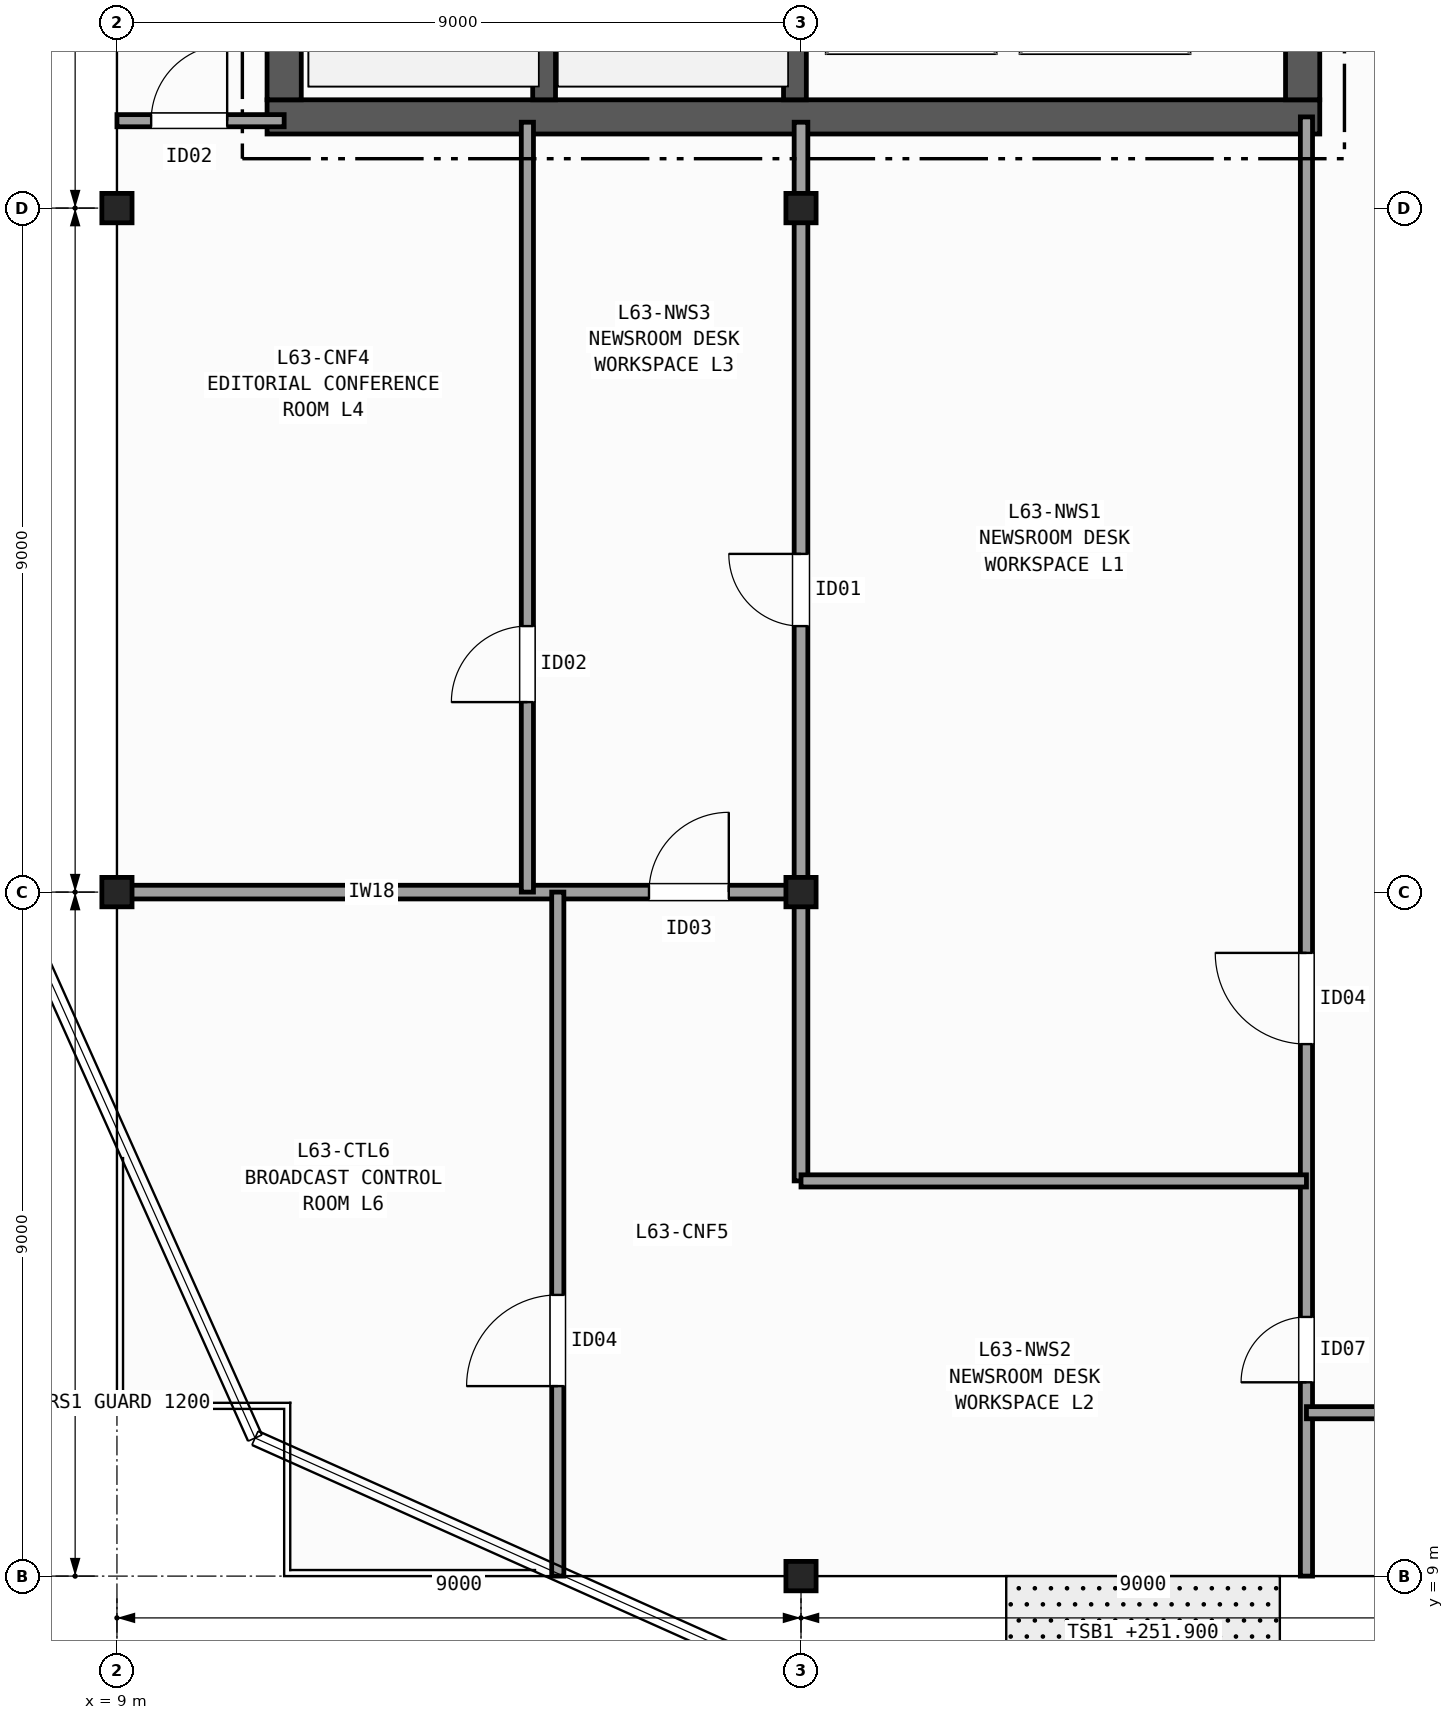
"""IFC4 building model, lengths in metres.
Left out: names, types, materials, properties, quantities, classifications, styles, units other than length and angle.
Written with IfcOpenShell. Run it as: python <this file> out.ifc"""

import sys

from ifc_helpers import new_model, si_unit, direction, frame, frame_2d, origin, origin_2d, place, context, subcontext, project, spatial, rectangle, i_section, extrude, element, fill, save


model = new_model("IFC4")
c1 = context("Model", 3, precision=1e-05, world=origin(), true_north=direction((0.0, 1.0)))
c2 = subcontext(c1, "Body", "Model", "MODEL_VIEW")
j1 = project(units=[si_unit("LENGTHUNIT", "METRE"), si_unit("PLANEANGLEUNIT", "RADIAN")], contexts=[c1])
p1 = place(None, origin())
s1 = spatial("IfcSite", under=j1, at=p1, CompositionType="ELEMENT")
p2 = place(p1, origin())
s2 = spatial("IfcBuilding", under=s1, at=p2, CompositionType="ELEMENT")
p3 = place(p2, frame((0.0, 0.0, 251.9)))
s3 = spatial("IfcBuildingStorey", under=s2, at=p3, CompositionType="ELEMENT", Elevation=251.9)
for number, where, z_axis, x_axis in (
    (1, (9.0, 18.0, 0.0), (0.0, 0.0, 1.0), (1.0, 0.0, 0.0)),
    (2, (9.0, 27.0, 0.0), (0.0, 0.0, 1.0), (1.0, 0.0, 0.0)),
    (3, (18.0, 9.0, 0.0), (0.0, 0.0, 1.0), (1.0, 0.0, 0.0)),
    (4, (18.0, 18.0, 0.0), (0.0, 0.0, 1.0), (1.0, 0.0, 0.0)),
    (5, (18.0, 27.0, 0.0), (0.0, 0.0, 1.0), (1.0, 0.0, 0.0)),
):
    element("IfcColumn", number, at=place(p3, frame(where, z_axis=z_axis, x_axis=x_axis)), inside=s3, PredefinedType="COLUMN", context=c2, shape_type="SweptSolid", body=[
        extrude(i_section(OverallWidth=0.397, OverallDepth=0.387, WebThickness=0.021, FlangeThickness=0.033, FilletRadius=0.015, at=origin_2d()), origin(), (0.0, 0.0, 1.0), 3.7),
    ])
p4 = place(p3, frame((10.975, 28.2, 0.0), z_axis=(0.0, 0.0, 1.0), x_axis=(1.0, 0.0, 0.0)))
e6 = element("IfcWall", 6, at=p4, inside=s3, PredefinedType="SHEAR", context=c2, shape_type="SweptSolid", body=[
    extrude(rectangle(XDim=13.85, YDim=0.45, at=frame_2d((6.925, 0.0))), origin(), (0.0, 0.0, 1.0), 3.42),
])
p5 = place(p3, frame((11.2, 42.175, 0.0), z_axis=(0.0, 0.0, 1.0), x_axis=(0.0, -1.0, 0.0)))
e7 = element("IfcWall", 7, at=p5, inside=s3, PredefinedType="SHEAR", context=c2, shape_type="SweptSolid", body=[
    extrude(rectangle(XDim=13.75, YDim=0.45, at=frame_2d((6.875, 0.0))), origin(), (0.0, 0.0, 1.0), 3.42),
])
p6 = place(p3, frame((24.6, 28.425, 0.0), z_axis=(0.0, 0.0, 1.0), x_axis=(0.0, 1.0, 0.0)))
e8 = element("IfcWall", 8, at=p6, inside=s3, PredefinedType="SHEAR", context=c2, shape_type="SweptSolid", body=[
    extrude(rectangle(XDim=13.75, YDim=0.45, at=frame_2d((6.875, 0.0))), origin(), (0.0, 0.0, 1.0), 3.42),
])
p7 = place(p6, frame((3.375, 0.0, 0.0)))
e9 = element("IfcOpeningElement", 9, at=p7, cuts=e8, PredefinedType="OPENING", context=c2, shape_type="SweptSolid", body=[
    extrude(rectangle(XDim=1.5, YDim=2.2, at=frame_2d((0.75, 1.1))), frame((0.0, 0.235, 0.0), z_axis=(0.0, -1.0, 0.0), x_axis=(1.0, 0.0, 0.0)), (0.0, 0.0, 1.0), 0.47),
])
p8 = place(p6, frame((9.975, 0.0, 0.0)))
e10 = element("IfcOpeningElement", 10, at=p8, cuts=e8, PredefinedType="OPENING", context=c2, shape_type="SweptSolid", body=[
    extrude(rectangle(XDim=0.9, YDim=2.1, at=frame_2d((0.45, 1.05))), frame((0.0, 0.235, 0.0), z_axis=(0.0, -1.0, 0.0), x_axis=(1.0, 0.0, 0.0)), (0.0, 0.0, 1.0), 0.47),
])
p9 = place(p6, frame((12.075, 0.0, 0.0)))
e11 = element("IfcOpeningElement", 11, at=p9, cuts=e8, PredefinedType="OPENING", context=c2, shape_type="SweptSolid", body=[
    extrude(rectangle(XDim=0.9, YDim=2.1, at=frame_2d((0.45, 1.05))), frame((0.0, 0.235, 0.0), z_axis=(0.0, -1.0, 0.0), x_axis=(1.0, 0.0, 0.0)), (0.0, 0.0, 1.0), 0.47),
])
p10 = place(p3, frame((14.62, 28.425, 0.0), z_axis=(0.0, 0.0, 1.0), x_axis=(0.0, 1.0, 0.0)))
e12 = element("IfcWall", 12, at=p10, inside=s3, PredefinedType="SHEAR", context=c2, shape_type="SweptSolid", body=[
    extrude(rectangle(XDim=9.025, YDim=0.3, at=frame_2d((4.512, 0.0))), origin(), (0.0, 0.0, 1.0), 3.42),
])
p11 = place(p3, frame((17.92, 42.175, 0.0), z_axis=(0.0, 0.0, 1.0), x_axis=(0.0, -1.0, 0.0)))
e13 = element("IfcWall", 13, at=p11, inside=s3, PredefinedType="SHEAR", context=c2, shape_type="SweptSolid", body=[
    extrude(rectangle(XDim=13.75, YDim=0.3, at=frame_2d((6.875, 0.0))), origin(), (0.0, 0.0, 1.0), 3.42),
])
p12 = place(p11, frame((2.0, 0.0, 0.0)))
e14 = element("IfcOpeningElement", 14, at=p12, cuts=e13, PredefinedType="OPENING", context=c2, shape_type="SweptSolid", body=[
    extrude(rectangle(XDim=1.15, YDim=2.15, at=frame_2d((0.575, 1.075))), frame((0.0, 0.16, 0.0), z_axis=(0.0, -1.0, 0.0), x_axis=(1.0, 0.0, 0.0)), (0.0, 0.0, 1.0), 0.32),
])
p13 = place(p3, frame((9.0, 28.15, 0.0), z_axis=(0.0, 0.0, 1.0), x_axis=(1.0, 0.0, 0.0)))
e15 = element("IfcWall", 15, at=p13, inside=s3, PredefinedType="PARTITIONING", context=c2, shape_type="SweptSolid", body=[
    extrude(rectangle(XDim=2.2, YDim=0.16, at=frame_2d((1.1, 0.0))), origin(), (0.0, 0.0, 1.0), 2.707),
])
p14 = place(p13, frame((0.45, 0.0, 0.0)))
e16 = element("IfcOpeningElement", 16, at=p14, cuts=e15, PredefinedType="OPENING", context=c2, shape_type="SweptSolid", body=[
    extrude(rectangle(XDim=1.0, YDim=2.1, at=frame_2d((0.5, 1.05))), frame((0.0, 0.09, 0.0), z_axis=(0.0, -1.0, 0.0), x_axis=(1.0, 0.0, 0.0)), (0.0, 0.0, 1.0), 0.18),
])
p15 = place(p3, frame((24.65, 9.0, 0.0), z_axis=(0.0, 0.0, 1.0), x_axis=(0.0, 1.0, 0.0)))
e17 = element("IfcWall", 17, at=p15, inside=s3, PredefinedType="PARTITIONING", context=c2, shape_type="SweptSolid", body=[
    extrude(rectangle(XDim=19.2, YDim=0.16, at=frame_2d((9.6, 0.0))), origin(), (0.0, 0.0, 1.0), 2.707),
])
p16 = place(p15, frame((7.0, 0.0, 0.0)))
e18 = element("IfcOpeningElement", 18, at=p16, cuts=e17, PredefinedType="OPENING", context=c2, shape_type="SweptSolid", body=[
    extrude(rectangle(XDim=1.2, YDim=2.15, at=frame_2d((0.6, 1.075))), frame((0.0, 0.09, 0.0), z_axis=(0.0, -1.0, 0.0), x_axis=(1.0, 0.0, 0.0)), (0.0, 0.0, 1.0), 0.18),
])
p17 = place(p15, frame((2.55, 0.0, 0.0)))
e19 = element("IfcOpeningElement", 19, at=p17, cuts=e17, PredefinedType="OPENING", context=c2, shape_type="SweptSolid", body=[
    extrude(rectangle(XDim=0.86, YDim=2.05, at=frame_2d((0.43, 1.025))), frame((0.0, 0.09, 0.0), z_axis=(0.0, -1.0, 0.0), x_axis=(1.0, 0.0, 0.0)), (0.0, 0.0, 1.0), 0.18),
])
p18 = place(p3, frame((9.0, 18.0, 0.0), z_axis=(0.0, 0.0, 1.0), x_axis=(1.0, 0.0, 0.0)))
e20 = element("IfcWall", 20, at=p18, inside=s3, PredefinedType="PARTITIONING", context=c2, shape_type="SweptSolid", body=[
    extrude(rectangle(XDim=9.08, YDim=0.18, at=frame_2d((4.54, 0.0))), origin(), (0.0, 0.0, 1.0), 2.707),
])
p19 = place(p18, frame((7.0, 0.0, 0.0)))
e21 = element("IfcOpeningElement", 21, at=p19, cuts=e20, PredefinedType="OPENING", context=c2, shape_type="SweptSolid", body=[
    extrude(rectangle(XDim=1.05, YDim=2.15, at=frame_2d((0.525, 1.075))), frame((0.0, 0.1, 0.0), z_axis=(0.0, -1.0, 0.0), x_axis=(1.0, 0.0, 0.0)), (0.0, 0.0, 1.0), 0.2),
])
p20 = place(p3, frame((18.0, 14.2, 0.0), z_axis=(0.0, 0.0, 1.0), x_axis=(0.0, 1.0, 0.0)))
e22 = element("IfcWall", 22, at=p20, inside=s3, PredefinedType="PARTITIONING", context=c2, shape_type="SweptSolid", body=[
    extrude(rectangle(XDim=13.93, YDim=0.18, at=frame_2d((6.965, 0.0))), origin(), (0.0, 0.0, 1.0), 2.789),
])
p21 = place(p20, frame((7.3, 0.0, 0.0)))
e23 = element("IfcOpeningElement", 23, at=p21, cuts=e22, PredefinedType="OPENING", context=c2, shape_type="SweptSolid", body=[
    extrude(rectangle(XDim=0.95, YDim=2.1, at=frame_2d((0.475, 1.05))), frame((0.0, 0.1, 0.0), z_axis=(0.0, -1.0, 0.0), x_axis=(1.0, 0.0, 0.0)), (0.0, 0.0, 1.0), 0.2),
])
p22 = place(p3, frame((18.0, 14.2, 0.0), z_axis=(0.0, 0.0, 1.0), x_axis=(1.0, 0.0, 0.0)))
e24 = element("IfcWall", 24, at=p22, inside=s3, PredefinedType="PARTITIONING", context=c2, shape_type="SweptSolid", body=[
    extrude(rectangle(XDim=6.65, YDim=0.16, at=frame_2d((3.325, 0.0))), origin(), (0.0, 0.0, 1.0), 2.789),
])
p23 = place(p3, frame((14.4, 18.0, 0.0), z_axis=(0.0, 0.0, 1.0), x_axis=(0.0, 1.0, 0.0)))
e25 = element("IfcWall", 25, at=p23, inside=s3, PredefinedType="PARTITIONING", context=c2, shape_type="SweptSolid", body=[
    extrude(rectangle(XDim=10.13, YDim=0.16, at=frame_2d((5.065, 0.0))), origin(), (0.0, 0.0, 1.0), 2.789),
])
p24 = place(p23, frame((2.5, 0.0, 0.0)))
e26 = element("IfcOpeningElement", 26, at=p24, cuts=e25, PredefinedType="OPENING", context=c2, shape_type="SweptSolid", body=[
    extrude(rectangle(XDim=1.0, YDim=2.1, at=frame_2d((0.5, 1.05))), frame((0.0, 0.09, 0.0), z_axis=(0.0, -1.0, 0.0), x_axis=(1.0, 0.0, 0.0)), (0.0, 0.0, 1.0), 0.18),
])
p25 = place(p3, frame((14.8, 9.0, 0.0), z_axis=(0.0, 0.0, 1.0), x_axis=(0.0, 1.0, 0.0)))
e27 = element("IfcWall", 27, at=p25, inside=s3, PredefinedType="PARTITIONING", context=c2, shape_type="SweptSolid", body=[
    extrude(rectangle(XDim=9.0, YDim=0.16, at=frame_2d((4.5, 0.0))), origin(), (0.0, 0.0, 1.0), 2.789),
])
p26 = place(p25, frame((2.5, 0.0, 0.0)))
e28 = element("IfcOpeningElement", 28, at=p26, cuts=e27, PredefinedType="OPENING", context=c2, shape_type="SweptSolid", body=[
    extrude(rectangle(XDim=1.2, YDim=2.15, at=frame_2d((0.6, 1.075))), frame((0.0, 0.09, 0.0), z_axis=(0.0, -1.0, 0.0), x_axis=(1.0, 0.0, 0.0)), (0.0, 0.0, 1.0), 0.18),
])
p27 = place(p3, frame((24.65, 11.15, 0.0), z_axis=(0.0, 0.0, 1.0), x_axis=(1.0, 0.0, 0.0)))
e29 = element("IfcWall", 29, at=p27, inside=s3, PredefinedType="PARTITIONING", context=c2, shape_type="SweptSolid", body=[
    extrude(rectangle(XDim=4.75, YDim=0.16, at=frame_2d((2.375, 0.0))), origin(), (0.0, 0.0, 1.0), 2.792),
])
p28 = place(p27, frame((1.2, 0.0, 0.0)))
e30 = element("IfcOpeningElement", 30, at=p28, cuts=e29, PredefinedType="OPENING", context=c2, shape_type="SweptSolid", body=[
    extrude(rectangle(XDim=0.86, YDim=2.05, at=frame_2d((0.43, 1.025))), frame((0.0, 0.09, 0.0), z_axis=(0.0, -1.0, 0.0), x_axis=(1.0, 0.0, 0.0)), (0.0, 0.0, 1.0), 0.18),
])
p29 = place(p14, origin())
e31 = element("IfcDoor", 31, at=p29, inside=s3, OperationType="SINGLE_SWING_RIGHT", PredefinedType="DOOR", context=c2, shape_type="SweptSolid", body=[
    extrude(rectangle(XDim=1.0, YDim=2.1, at=frame_2d((0.5, 1.05))), frame((0.0, 0.025, 0.0), z_axis=(0.0, -1.0, 0.0), x_axis=(1.0, 0.0, 0.0)), (0.0, 0.0, 1.0), 0.05),
])
fill(e16, e31)
p30 = place(p16, origin())
e32 = element("IfcDoor", 32, at=p30, inside=s3, OperationType="SINGLE_SWING_RIGHT", PredefinedType="DOOR", context=c2, shape_type="SweptSolid", body=[
    extrude(rectangle(XDim=1.2, YDim=2.15, at=frame_2d((0.6, 1.075))), frame((0.0, 0.025, 0.0), z_axis=(0.0, -1.0, 0.0), x_axis=(1.0, 0.0, 0.0)), (0.0, 0.0, 1.0), 0.05),
])
fill(e18, e32)
p31 = place(p17, origin())
e33 = element("IfcDoor", 33, at=p31, inside=s3, OperationType="SINGLE_SWING_LEFT", PredefinedType="DOOR", context=c2, shape_type="SweptSolid", body=[
    extrude(rectangle(XDim=0.86, YDim=2.05, at=frame_2d((0.43, 1.025))), frame((0.0, 0.025, 0.0), z_axis=(0.0, -1.0, 0.0), x_axis=(1.0, 0.0, 0.0)), (0.0, 0.0, 1.0), 0.05),
])
fill(e19, e33)
p32 = place(p21, origin())
e34 = element("IfcDoor", 34, at=p32, inside=s3, OperationType="SINGLE_SWING_RIGHT", PredefinedType="DOOR", context=c2, shape_type="SweptSolid", body=[
    extrude(rectangle(XDim=0.95, YDim=2.1, at=frame_2d((0.475, 1.05))), frame((0.0, 0.025, 0.0), z_axis=(0.0, -1.0, 0.0), x_axis=(1.0, 0.0, 0.0)), (0.0, 0.0, 1.0), 0.05),
])
fill(e23, e34)
p33 = place(p24, origin())
e35 = element("IfcDoor", 35, at=p33, inside=s3, OperationType="SINGLE_SWING_LEFT", PredefinedType="DOOR", context=c2, shape_type="SweptSolid", body=[
    extrude(rectangle(XDim=1.0, YDim=2.1, at=frame_2d((0.5, 1.05))), frame((0.0, 0.025, 0.0), z_axis=(0.0, -1.0, 0.0), x_axis=(1.0, 0.0, 0.0)), (0.0, 0.0, 1.0), 0.05),
])
fill(e26, e35)
p34 = place(p19, origin())
e36 = element("IfcDoor", 36, at=p34, inside=s3, OperationType="SINGLE_SWING_RIGHT", PredefinedType="DOOR", context=c2, shape_type="SweptSolid", body=[
    extrude(rectangle(XDim=1.05, YDim=2.15, at=frame_2d((0.525, 1.075))), frame((0.0, 0.025, 0.0), z_axis=(0.0, -1.0, 0.0), x_axis=(1.0, 0.0, 0.0)), (0.0, 0.0, 1.0), 0.05),
])
fill(e21, e36)
p35 = place(p26, origin())
e37 = element("IfcDoor", 37, at=p35, inside=s3, OperationType="SINGLE_SWING_LEFT", PredefinedType="DOOR", context=c2, shape_type="SweptSolid", body=[
    extrude(rectangle(XDim=1.2, YDim=2.15, at=frame_2d((0.6, 1.075))), frame((0.0, 0.025, 0.0), z_axis=(0.0, -1.0, 0.0), x_axis=(1.0, 0.0, 0.0)), (0.0, 0.0, 1.0), 0.05),
])
fill(e28, e37)
save(model, sys.argv[1])
